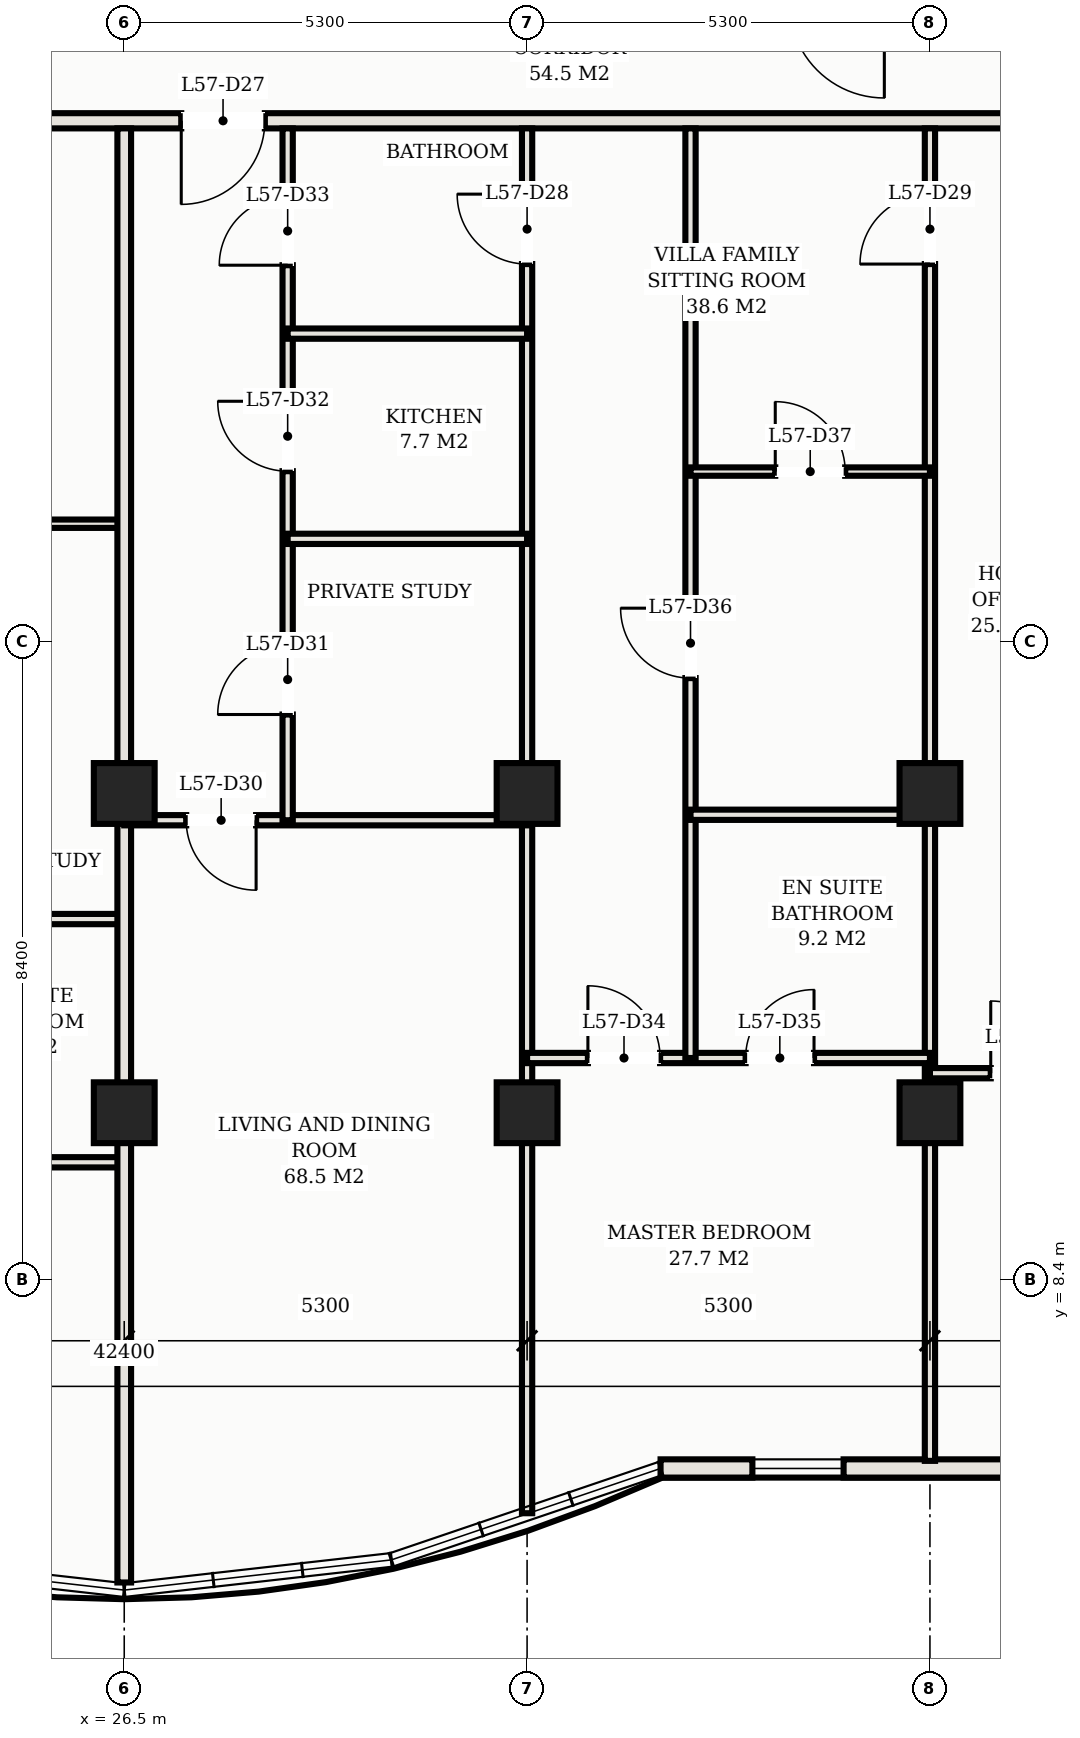
"""IFC4 building model, lengths in metres.
Left out: names, types, materials, properties, quantities, classifications, styles, units other than length and angle.
Written with IfcOpenShell. Run it as: python <this file> out.ifc"""

import sys

from ifc_helpers import new_model, si_unit, direction, frame, frame_2d, origin, origin_2d, place, context, subcontext, project, spatial, rectangle, hollow_rectangle, extrude, element, fill, save


model = new_model("IFC4")
c1 = context("Model", 3, precision=1e-05, world=origin(), true_north=direction((0.0, 1.0)))
c2 = subcontext(c1, "Body", "Model", "MODEL_VIEW")
j1 = project(units=[si_unit("LENGTHUNIT", "METRE"), si_unit("PLANEANGLEUNIT", "RADIAN")], contexts=[c1])
p1 = place(None, origin())
s1 = spatial("IfcSite", under=j1, at=p1, CompositionType="ELEMENT")
p2 = place(p1, origin())
s2 = spatial("IfcBuilding", under=s1, at=p2, CompositionType="ELEMENT")
p3 = place(p2, frame((0.0, 0.0, 209.9)))
s3 = spatial("IfcBuildingStorey", under=s2, at=p3, CompositionType="ELEMENT", Elevation=209.9)
for number, where, z_axis, x_axis in (
    (1, (26.5, 14.8, 0.0), (0.0, 0.0, 1.0), (1.0, 0.0, 0.0)),
    (2, (26.5, 10.6, 0.0), (0.0, 0.0, 1.0), (1.0, 0.0, 0.0)),
    (3, (31.8, 14.8, 0.0), (0.0, 0.0, 1.0), (1.0, 0.0, 0.0)),
    (4, (31.8, 10.6, 0.0), (0.0, 0.0, 1.0), (1.0, 0.0, 0.0)),
    (5, (37.1, 14.8, 0.0), (0.0, 0.0, 1.0), (1.0, 0.0, 0.0)),
    (6, (37.1, 10.6, 0.0), (0.0, 0.0, 1.0), (1.0, 0.0, 0.0)),
):
    element("IfcColumn", number, at=place(p3, frame(where, z_axis=z_axis, x_axis=x_axis)), inside=s3, PredefinedType="COLUMN", context=c2, shape_type="SweptSolid", body=[
        extrude(hollow_rectangle(XDim=0.8, YDim=0.8, WallThickness=0.028, at=origin_2d()), origin(), (0.0, 0.0, 1.0), 3.3),
    ])
p4 = place(p3, frame((33.556, 5.92, 0.0), z_axis=(0.0, 0.0, 1.0), x_axis=(1.0, 0.0, 0.0)))
e7 = element("IfcWall", 7, at=p4, inside=s3, PredefinedType="SOLIDWALL", context=c2, shape_type="SweptSolid", body=[
    extrude(rectangle(XDim=8.124, YDim=0.24, at=frame_2d((4.062, 0.0))), origin(), (0.0, 0.0, 1.0), 3.11),
])
p5 = place(p4, frame((5.198, 0.0, 0.75)))
e8 = element("IfcOpeningElement", 8, at=p5, cuts=e7, PredefinedType="OPENING", context=c2, shape_type="SweptSolid", body=[
    extrude(rectangle(XDim=1.2, YDim=1.5, at=frame_2d((0.6, 0.75))), frame((0.0, 0.13, 0.0), z_axis=(0.0, -1.0, 0.0), x_axis=(1.0, 0.0, 0.0)), (0.0, 0.0, 1.0), 0.26),
])
p6 = place(p4, frame((1.208, 0.0, 0.75)))
e9 = element("IfcOpeningElement", 9, at=p6, cuts=e7, PredefinedType="OPENING", context=c2, shape_type="SweptSolid", body=[
    extrude(rectangle(XDim=1.2, YDim=1.5, at=frame_2d((0.6, 0.75))), frame((0.0, 0.13, 0.0), z_axis=(0.0, -1.0, 0.0), x_axis=(1.0, 0.0, 0.0)), (0.0, 0.0, 1.0), 0.26),
])
p7 = place(p3, frame((6.72, 23.65, 0.0), z_axis=(0.0, 0.0, 1.0), x_axis=(1.0, 0.0, 0.0)))
e10 = element("IfcWall", 10, at=p7, inside=s3, PredefinedType="PARTITIONING", context=c2, shape_type="SweptSolid", body=[
    extrude(rectangle(XDim=39.56, YDim=0.2, at=frame_2d((19.78, 0.0))), origin(), (0.0, 0.0, 1.0), 2.43),
])
p8 = place(p7, frame((4.63, 0.0, 0.0)))
e11 = element("IfcOpeningElement", 11, at=p8, cuts=e10, PredefinedType="OPENING", context=c2, shape_type="SweptSolid", body=[
    extrude(rectangle(XDim=1.1, YDim=2.25, at=frame_2d((0.55, 1.125))), frame((0.0, 0.11, 0.0), z_axis=(0.0, -1.0, 0.0), x_axis=(1.0, 0.0, 0.0)), (0.0, 0.0, 1.0), 0.22),
])
p9 = place(p7, frame((20.53, 0.0, 0.0)))
e12 = element("IfcOpeningElement", 12, at=p9, cuts=e10, PredefinedType="OPENING", context=c2, shape_type="SweptSolid", body=[
    extrude(rectangle(XDim=1.1, YDim=2.25, at=frame_2d((0.55, 1.125))), frame((0.0, 0.11, 0.0), z_axis=(0.0, -1.0, 0.0), x_axis=(1.0, 0.0, 0.0)), (0.0, 0.0, 1.0), 0.22),
])
p10 = place(p7, frame((2.085, 0.0, 0.0)))
e13 = element("IfcOpeningElement", 13, at=p10, cuts=e10, PredefinedType="OPENING", context=c2, shape_type="SweptSolid", body=[
    extrude(rectangle(XDim=0.92, YDim=2.15, at=frame_2d((0.46, 1.075))), frame((0.0, 0.11, 0.0), z_axis=(0.0, -1.0, 0.0), x_axis=(1.0, 0.0, 0.0)), (0.0, 0.0, 1.0), 0.22),
])
p11 = place(p7, frame((36.555, 0.0, 0.0)))
e14 = element("IfcOpeningElement", 14, at=p11, cuts=e10, PredefinedType="OPENING", context=c2, shape_type="SweptSolid", body=[
    extrude(rectangle(XDim=0.92, YDim=2.15, at=frame_2d((0.46, 1.075))), frame((0.0, 0.11, 0.0), z_axis=(0.0, -1.0, 0.0), x_axis=(1.0, 0.0, 0.0)), (0.0, 0.0, 1.0), 0.22),
])
p12 = place(p3, frame((21.2, 9.948, 0.0), z_axis=(0.0, 0.0, 1.0), x_axis=(1.0, 0.0, 0.0)))
e15 = element("IfcWall", 15, at=p12, inside=s3, PredefinedType="PARTITIONING", context=c2, shape_type="SweptSolid", body=[
    extrude(rectangle(XDim=5.3, YDim=0.135, at=frame_2d((2.65, 0.0))), origin(), (0.0, 0.0, 1.0), 2.43),
])
p13 = place(p12, frame((0.8, 0.0, 0.0)))
e16 = element("IfcOpeningElement", 16, at=p13, cuts=e15, PredefinedType="OPENING", context=c2, shape_type="SweptSolid", body=[
    extrude(rectangle(XDim=0.95, YDim=2.15, at=frame_2d((0.475, 1.075))), frame((0.0, 0.078, 0.0), z_axis=(0.0, -1.0, 0.0), x_axis=(1.0, 0.0, 0.0)), (0.0, 0.0, 1.0), 0.155),
])
p14 = place(p12, frame((2.625, 0.0, 0.0)))
e17 = element("IfcOpeningElement", 17, at=p14, cuts=e15, PredefinedType="OPENING", context=c2, shape_type="SweptSolid", body=[
    extrude(rectangle(XDim=0.9, YDim=2.15, at=frame_2d((0.45, 1.075))), frame((0.0, 0.078, 0.0), z_axis=(0.0, -1.0, 0.0), x_axis=(1.0, 0.0, 0.0)), (0.0, 0.0, 1.0), 0.155),
])
p15 = place(p3, frame((23.35, 13.148, 0.0), z_axis=(0.0, 0.0, 1.0), x_axis=(1.0, 0.0, 0.0)))
e18 = element("IfcWall", 18, at=p15, inside=s3, PredefinedType="PARTITIONING", context=c2, shape_type="SweptSolid", body=[
    extrude(rectangle(XDim=3.15, YDim=0.135, at=frame_2d((1.575, 0.0))), origin(), (0.0, 0.0, 1.0), 2.43),
])
p16 = place(p3, frame((23.35, 18.349, 0.0), z_axis=(0.0, 0.0, 1.0), x_axis=(1.0, 0.0, 0.0)))
e19 = element("IfcWall", 19, at=p16, inside=s3, PredefinedType="MOVABLE", context=c2, shape_type="SweptSolid", body=[
    extrude(rectangle(XDim=3.15, YDim=0.11, at=frame_2d((1.575, 0.0))), origin(), (0.0, 0.0, 1.0), 2.43),
])
p17 = place(p16, frame((1.115, 0.0, 0.0)))
e20 = element("IfcOpeningElement", 20, at=p17, cuts=e19, PredefinedType="OPENING", context=c2, shape_type="SweptSolid", body=[
    extrude(rectangle(XDim=0.92, YDim=2.15, at=frame_2d((0.46, 1.075))), frame((0.0, 0.065, 0.0), z_axis=(0.0, -1.0, 0.0), x_axis=(1.0, 0.0, 0.0)), (0.0, 0.0, 1.0), 0.13),
])
p18 = place(p3, frame((26.5, 4.42, 0.0), z_axis=(0.0, 0.0, 1.0), x_axis=(0.0, 1.0, 0.0)))
e21 = element("IfcWall", 21, at=p18, inside=s3, PredefinedType="PARTITIONING", context=c2, shape_type="SweptSolid", body=[
    extrude(rectangle(XDim=19.13, YDim=0.18, at=frame_2d((9.565, 0.0))), origin(), (0.0, 0.0, 1.0), 2.43),
])
p19 = place(p3, frame((31.8, 5.331, 0.0), z_axis=(0.0, 0.0, 1.0), x_axis=(0.0, 1.0, 0.0)))
e22 = element("IfcWall", 22, at=p19, inside=s3, PredefinedType="PARTITIONING", context=c2, shape_type="SweptSolid", body=[
    extrude(rectangle(XDim=18.219, YDim=0.135, at=frame_2d((9.109, 0.0))), origin(), (0.0, 0.0, 1.0), 2.43),
])
p20 = place(p19, frame((16.434, 0.0, 0.0)))
e23 = element("IfcOpeningElement", 23, at=p20, cuts=e22, PredefinedType="OPENING", context=c2, shape_type="SweptSolid", body=[
    extrude(rectangle(XDim=0.92, YDim=2.15, at=frame_2d((0.46, 1.075))), frame((0.0, 0.078, 0.0), z_axis=(0.0, -1.0, 0.0), x_axis=(1.0, 0.0, 0.0)), (0.0, 0.0, 1.0), 0.155),
])
p21 = place(p3, frame((37.1, 6.02, 0.0), z_axis=(0.0, 0.0, 1.0), x_axis=(0.0, 1.0, 0.0)))
e24 = element("IfcWall", 24, at=p21, inside=s3, PredefinedType="PARTITIONING", context=c2, shape_type="SweptSolid", body=[
    extrude(rectangle(XDim=17.53, YDim=0.135, at=frame_2d((8.765, 0.0))), origin(), (0.0, 0.0, 1.0), 2.43),
])
p22 = place(p21, frame((15.745, 0.0, 0.0)))
e25 = element("IfcOpeningElement", 25, at=p22, cuts=e24, PredefinedType="OPENING", context=c2, shape_type="SweptSolid", body=[
    extrude(rectangle(XDim=0.92, YDim=2.15, at=frame_2d((0.46, 1.075))), frame((0.0, 0.078, 0.0), z_axis=(0.0, -1.0, 0.0), x_axis=(1.0, 0.0, 0.0)), (0.0, 0.0, 1.0), 0.155),
])
p23 = place(p3, frame((26.5, 14.448, 0.0), z_axis=(0.0, 0.0, 1.0), x_axis=(1.0, 0.0, 0.0)))
e26 = element("IfcWall", 26, at=p23, inside=s3, PredefinedType="PARTITIONING", context=c2, shape_type="SweptSolid", body=[
    extrude(rectangle(XDim=5.3, YDim=0.135, at=frame_2d((2.65, 0.0))), origin(), (0.0, 0.0, 1.0), 2.43),
])
p24 = place(p23, frame((0.815, 0.0, 0.0)))
e27 = element("IfcOpeningElement", 27, at=p24, cuts=e26, PredefinedType="OPENING", context=c2, shape_type="SweptSolid", body=[
    extrude(rectangle(XDim=0.92, YDim=2.15, at=frame_2d((0.46, 1.075))), frame((0.0, 0.078, 0.0), z_axis=(0.0, -1.0, 0.0), x_axis=(1.0, 0.0, 0.0)), (0.0, 0.0, 1.0), 0.155),
])
p25 = place(p3, frame((28.65, 14.448, 0.0), z_axis=(0.0, 0.0, 1.0), x_axis=(0.0, 1.0, 0.0)))
e28 = element("IfcWall", 28, at=p25, inside=s3, PredefinedType="PARTITIONING", context=c2, shape_type="SweptSolid", body=[
    extrude(rectangle(XDim=9.102, YDim=0.135, at=frame_2d((4.551, 0.0))), origin(), (0.0, 0.0, 1.0), 2.43),
])
p26 = place(p25, frame((1.391, 0.0, 0.0)))
e29 = element("IfcOpeningElement", 29, at=p26, cuts=e28, PredefinedType="OPENING", context=c2, shape_type="SweptSolid", body=[
    extrude(rectangle(XDim=0.92, YDim=2.15, at=frame_2d((0.46, 1.075))), frame((0.0, 0.078, 0.0), z_axis=(0.0, -1.0, 0.0), x_axis=(1.0, 0.0, 0.0)), (0.0, 0.0, 1.0), 0.155),
])
p27 = place(p25, frame((4.592, 0.0, 0.0)))
e30 = element("IfcOpeningElement", 30, at=p27, cuts=e28, PredefinedType="OPENING", context=c2, shape_type="SweptSolid", body=[
    extrude(rectangle(XDim=0.92, YDim=2.15, at=frame_2d((0.46, 1.075))), frame((0.0, 0.078, 0.0), z_axis=(0.0, -1.0, 0.0), x_axis=(1.0, 0.0, 0.0)), (0.0, 0.0, 1.0), 0.155),
])
p28 = place(p25, frame((7.302, 0.0, 0.0)))
e31 = element("IfcOpeningElement", 31, at=p28, cuts=e28, PredefinedType="OPENING", context=c2, shape_type="SweptSolid", body=[
    extrude(rectangle(XDim=0.9, YDim=2.15, at=frame_2d((0.45, 1.075))), frame((0.0, 0.078, 0.0), z_axis=(0.0, -1.0, 0.0), x_axis=(1.0, 0.0, 0.0)), (0.0, 0.0, 1.0), 0.155),
])
for number, where, z_axis, x_axis in (
    (32, (28.65, 18.15, 0.0), (0.0, 0.0, 1.0), (1.0, 0.0, 0.0)),
    (33, (28.65, 20.85, 0.0), (0.0, 0.0, 1.0), (1.0, 0.0, 0.0)),
):
    element("IfcWall", number, at=place(p3, frame(where, z_axis=z_axis, x_axis=x_axis)), inside=s3, PredefinedType="PARTITIONING", context=c2, shape_type="SweptSolid", body=[
        extrude(rectangle(XDim=3.15, YDim=0.135, at=frame_2d((1.575, 0.0))), origin(), (0.0, 0.0, 1.0), 2.43),
    ])
p29 = place(p3, frame((31.8, 11.32, 0.0), z_axis=(0.0, 0.0, 1.0), x_axis=(1.0, 0.0, 0.0)))
e34 = element("IfcWall", 34, at=p29, inside=s3, PredefinedType="PARTITIONING", context=c2, shape_type="SweptSolid", body=[
    extrude(rectangle(XDim=5.3, YDim=0.135, at=frame_2d((2.65, 0.0))), origin(), (0.0, 0.0, 1.0), 2.43),
])
p30 = place(p29, frame((0.8, 0.0, 0.0)))
e35 = element("IfcOpeningElement", 35, at=p30, cuts=e34, PredefinedType="OPENING", context=c2, shape_type="SweptSolid", body=[
    extrude(rectangle(XDim=0.95, YDim=2.15, at=frame_2d((0.475, 1.075))), frame((0.0, 0.078, 0.0), z_axis=(0.0, -1.0, 0.0), x_axis=(1.0, 0.0, 0.0)), (0.0, 0.0, 1.0), 0.155),
])
p31 = place(p29, frame((2.875, 0.0, 0.0)))
e36 = element("IfcOpeningElement", 36, at=p31, cuts=e34, PredefinedType="OPENING", context=c2, shape_type="SweptSolid", body=[
    extrude(rectangle(XDim=0.9, YDim=2.15, at=frame_2d((0.45, 1.075))), frame((0.0, 0.078, 0.0), z_axis=(0.0, -1.0, 0.0), x_axis=(1.0, 0.0, 0.0)), (0.0, 0.0, 1.0), 0.155),
])
p32 = place(p3, frame((33.95, 11.32, 0.0), z_axis=(0.0, 0.0, 1.0), x_axis=(0.0, 1.0, 0.0)))
e37 = element("IfcWall", 37, at=p32, inside=s3, PredefinedType="PARTITIONING", context=c2, shape_type="SweptSolid", body=[
    extrude(rectangle(XDim=12.23, YDim=0.135, at=frame_2d((6.115, 0.0))), origin(), (0.0, 0.0, 1.0), 2.43),
])
p33 = place(p32, frame((4.998, 0.0, 0.0)))
e38 = element("IfcOpeningElement", 38, at=p33, cuts=e37, PredefinedType="OPENING", context=c2, shape_type="SweptSolid", body=[
    extrude(rectangle(XDim=0.92, YDim=2.15, at=frame_2d((0.46, 1.075))), frame((0.0, 0.078, 0.0), z_axis=(0.0, -1.0, 0.0), x_axis=(1.0, 0.0, 0.0)), (0.0, 0.0, 1.0), 0.155),
])
p34 = place(p3, frame((33.95, 14.52, 0.0), z_axis=(0.0, 0.0, 1.0), x_axis=(1.0, 0.0, 0.0)))
e39 = element("IfcWall", 39, at=p34, inside=s3, PredefinedType="PARTITIONING", context=c2, shape_type="SweptSolid", body=[
    extrude(rectangle(XDim=3.15, YDim=0.135, at=frame_2d((1.575, 0.0))), origin(), (0.0, 0.0, 1.0), 2.43),
])
p35 = place(p3, frame((33.95, 19.035, 0.0), z_axis=(0.0, 0.0, 1.0), x_axis=(1.0, 0.0, 0.0)))
e40 = element("IfcWall", 40, at=p35, inside=s3, PredefinedType="MOVABLE", context=c2, shape_type="SweptSolid", body=[
    extrude(rectangle(XDim=3.15, YDim=0.11, at=frame_2d((1.575, 0.0))), origin(), (0.0, 0.0, 1.0), 2.43),
])
p36 = place(p35, frame((1.115, 0.0, 0.0)))
e41 = element("IfcOpeningElement", 41, at=p36, cuts=e40, PredefinedType="OPENING", context=c2, shape_type="SweptSolid", body=[
    extrude(rectangle(XDim=0.92, YDim=2.15, at=frame_2d((0.46, 1.075))), frame((0.0, 0.065, 0.0), z_axis=(0.0, -1.0, 0.0), x_axis=(1.0, 0.0, 0.0)), (0.0, 0.0, 1.0), 0.13),
])
p37 = place(p3, frame((37.1, 11.12, 0.0), z_axis=(0.0, 0.0, 1.0), x_axis=(1.0, 0.0, 0.0)))
e42 = element("IfcWall", 42, at=p37, inside=s3, PredefinedType="PARTITIONING", context=c2, shape_type="SweptSolid", body=[
    extrude(rectangle(XDim=5.3, YDim=0.135, at=frame_2d((2.65, 0.0))), origin(), (0.0, 0.0, 1.0), 2.43),
])
p38 = place(p37, frame((0.8, 0.0, 0.0)))
e43 = element("IfcOpeningElement", 43, at=p38, cuts=e42, PredefinedType="OPENING", context=c2, shape_type="SweptSolid", body=[
    extrude(rectangle(XDim=0.95, YDim=2.15, at=frame_2d((0.475, 1.075))), frame((0.0, 0.078, 0.0), z_axis=(0.0, -1.0, 0.0), x_axis=(1.0, 0.0, 0.0)), (0.0, 0.0, 1.0), 0.155),
])
p39 = place(p9, frame((1.1, 0.0, 0.0), z_axis=(0.0, 0.0, 1.0), x_axis=(-1.0, 0.0, 0.0)))
e44 = element("IfcDoor", 44, at=p39, inside=s3, OperationType="SINGLE_SWING_RIGHT", PredefinedType="DOOR", context=c2, shape_type="SweptSolid", body=[
    extrude(rectangle(XDim=1.1, YDim=2.25, at=frame_2d((0.55, 1.125))), frame((0.0, 0.025, 0.0), z_axis=(0.0, -1.0, 0.0), x_axis=(1.0, 0.0, 0.0)), (0.0, 0.0, 1.0), 0.05),
])
fill(e12, e44)
p40 = place(p20, origin())
e45 = element("IfcDoor", 45, at=p40, inside=s3, OperationType="SINGLE_SWING_RIGHT", PredefinedType="DOOR", context=c2, shape_type="SweptSolid", body=[
    extrude(rectangle(XDim=0.92, YDim=2.15, at=frame_2d((0.46, 1.075))), frame((0.0, 0.025, 0.0), z_axis=(0.0, -1.0, 0.0), x_axis=(1.0, 0.0, 0.0)), (0.0, 0.0, 1.0), 0.05),
])
fill(e23, e45)
p41 = place(p22, origin())
e46 = element("IfcDoor", 46, at=p41, inside=s3, OperationType="SINGLE_SWING_LEFT", PredefinedType="DOOR", context=c2, shape_type="SweptSolid", body=[
    extrude(rectangle(XDim=0.92, YDim=2.15, at=frame_2d((0.46, 1.075))), frame((0.0, 0.025, 0.0), z_axis=(0.0, -1.0, 0.0), x_axis=(1.0, 0.0, 0.0)), (0.0, 0.0, 1.0), 0.05),
])
fill(e25, e46)
p42 = place(p24, frame((0.92, 0.0, 0.0), z_axis=(0.0, 0.0, 1.0), x_axis=(-1.0, 0.0, 0.0)))
e47 = element("IfcDoor", 47, at=p42, inside=s3, OperationType="SINGLE_SWING_LEFT", PredefinedType="DOOR", context=c2, shape_type="SweptSolid", body=[
    extrude(rectangle(XDim=0.92, YDim=2.15, at=frame_2d((0.46, 1.075))), frame((0.0, 0.025, 0.0), z_axis=(0.0, -1.0, 0.0), x_axis=(1.0, 0.0, 0.0)), (0.0, 0.0, 1.0), 0.05),
])
fill(e27, e47)
p43 = place(p26, origin())
e48 = element("IfcDoor", 48, at=p43, inside=s3, OperationType="SINGLE_SWING_LEFT", PredefinedType="DOOR", context=c2, shape_type="SweptSolid", body=[
    extrude(rectangle(XDim=0.92, YDim=2.15, at=frame_2d((0.46, 1.075))), frame((0.0, 0.025, 0.0), z_axis=(0.0, -1.0, 0.0), x_axis=(1.0, 0.0, 0.0)), (0.0, 0.0, 1.0), 0.05),
])
fill(e29, e48)
p44 = place(p27, origin())
e49 = element("IfcDoor", 49, at=p44, inside=s3, OperationType="SINGLE_SWING_RIGHT", PredefinedType="DOOR", context=c2, shape_type="SweptSolid", body=[
    extrude(rectangle(XDim=0.92, YDim=2.15, at=frame_2d((0.46, 1.075))), frame((0.0, 0.025, 0.0), z_axis=(0.0, -1.0, 0.0), x_axis=(1.0, 0.0, 0.0)), (0.0, 0.0, 1.0), 0.05),
])
fill(e30, e49)
p45 = place(p28, origin())
e50 = element("IfcDoor", 50, at=p45, inside=s3, OperationType="SINGLE_SWING_LEFT", PredefinedType="DOOR", context=c2, shape_type="SweptSolid", body=[
    extrude(rectangle(XDim=0.9, YDim=2.15, at=frame_2d((0.45, 1.075))), frame((0.0, 0.025, 0.0), z_axis=(0.0, -1.0, 0.0), x_axis=(1.0, 0.0, 0.0)), (0.0, 0.0, 1.0), 0.05),
])
fill(e31, e50)
p46 = place(p30, origin())
e51 = element("IfcDoor", 51, at=p46, inside=s3, OperationType="SINGLE_SWING_LEFT", PredefinedType="DOOR", context=c2, shape_type="SweptSolid", body=[
    extrude(rectangle(XDim=0.95, YDim=2.15, at=frame_2d((0.475, 1.075))), frame((0.0, 0.025, 0.0), z_axis=(0.0, -1.0, 0.0), x_axis=(1.0, 0.0, 0.0)), (0.0, 0.0, 1.0), 0.05),
])
fill(e35, e51)
p47 = place(p31, origin())
e52 = element("IfcDoor", 52, at=p47, inside=s3, OperationType="SINGLE_SWING_RIGHT", PredefinedType="DOOR", context=c2, shape_type="SweptSolid", body=[
    extrude(rectangle(XDim=0.9, YDim=2.15, at=frame_2d((0.45, 1.075))), frame((0.0, 0.025, 0.0), z_axis=(0.0, -1.0, 0.0), x_axis=(1.0, 0.0, 0.0)), (0.0, 0.0, 1.0), 0.05),
])
fill(e36, e52)
p48 = place(p33, origin())
e53 = element("IfcDoor", 53, at=p48, inside=s3, OperationType="SINGLE_SWING_RIGHT", PredefinedType="DOOR", context=c2, shape_type="SweptSolid", body=[
    extrude(rectangle(XDim=0.92, YDim=2.15, at=frame_2d((0.46, 1.075))), frame((0.0, 0.025, 0.0), z_axis=(0.0, -1.0, 0.0), x_axis=(1.0, 0.0, 0.0)), (0.0, 0.0, 1.0), 0.05),
])
fill(e38, e53)
p49 = place(p36, origin())
e54 = element("IfcDoor", 54, at=p49, inside=s3, OperationType="SINGLE_SWING_LEFT", PredefinedType="DOOR", context=c2, shape_type="SweptSolid", body=[
    extrude(rectangle(XDim=0.92, YDim=2.15, at=frame_2d((0.46, 1.075))), frame((0.0, 0.025, 0.0), z_axis=(0.0, -1.0, 0.0), x_axis=(1.0, 0.0, 0.0)), (0.0, 0.0, 1.0), 0.05),
])
fill(e41, e54)
p50 = place(p38, origin())
e55 = element("IfcDoor", 55, at=p50, inside=s3, OperationType="SINGLE_SWING_LEFT", PredefinedType="DOOR", context=c2, shape_type="SweptSolid", body=[
    extrude(rectangle(XDim=0.95, YDim=2.15, at=frame_2d((0.475, 1.075))), frame((0.0, 0.025, 0.0), z_axis=(0.0, -1.0, 0.0), x_axis=(1.0, 0.0, 0.0)), (0.0, 0.0, 1.0), 0.05),
])
fill(e43, e55)
p51 = place(p6, origin())
e56 = element("IfcWindow", 56, at=p51, inside=s3, PartitioningType="SINGLE_PANEL", PredefinedType="WINDOW", context=c2, shape_type="SweptSolid", body=[
    extrude(rectangle(XDim=1.2, YDim=1.5, at=frame_2d((0.6, 0.75))), frame((0.0, 0.03, 0.0), z_axis=(0.0, -1.0, 0.0), x_axis=(1.0, 0.0, 0.0)), (0.0, 0.0, 1.0), 0.06),
])
fill(e9, e56)
save(model, sys.argv[1])
